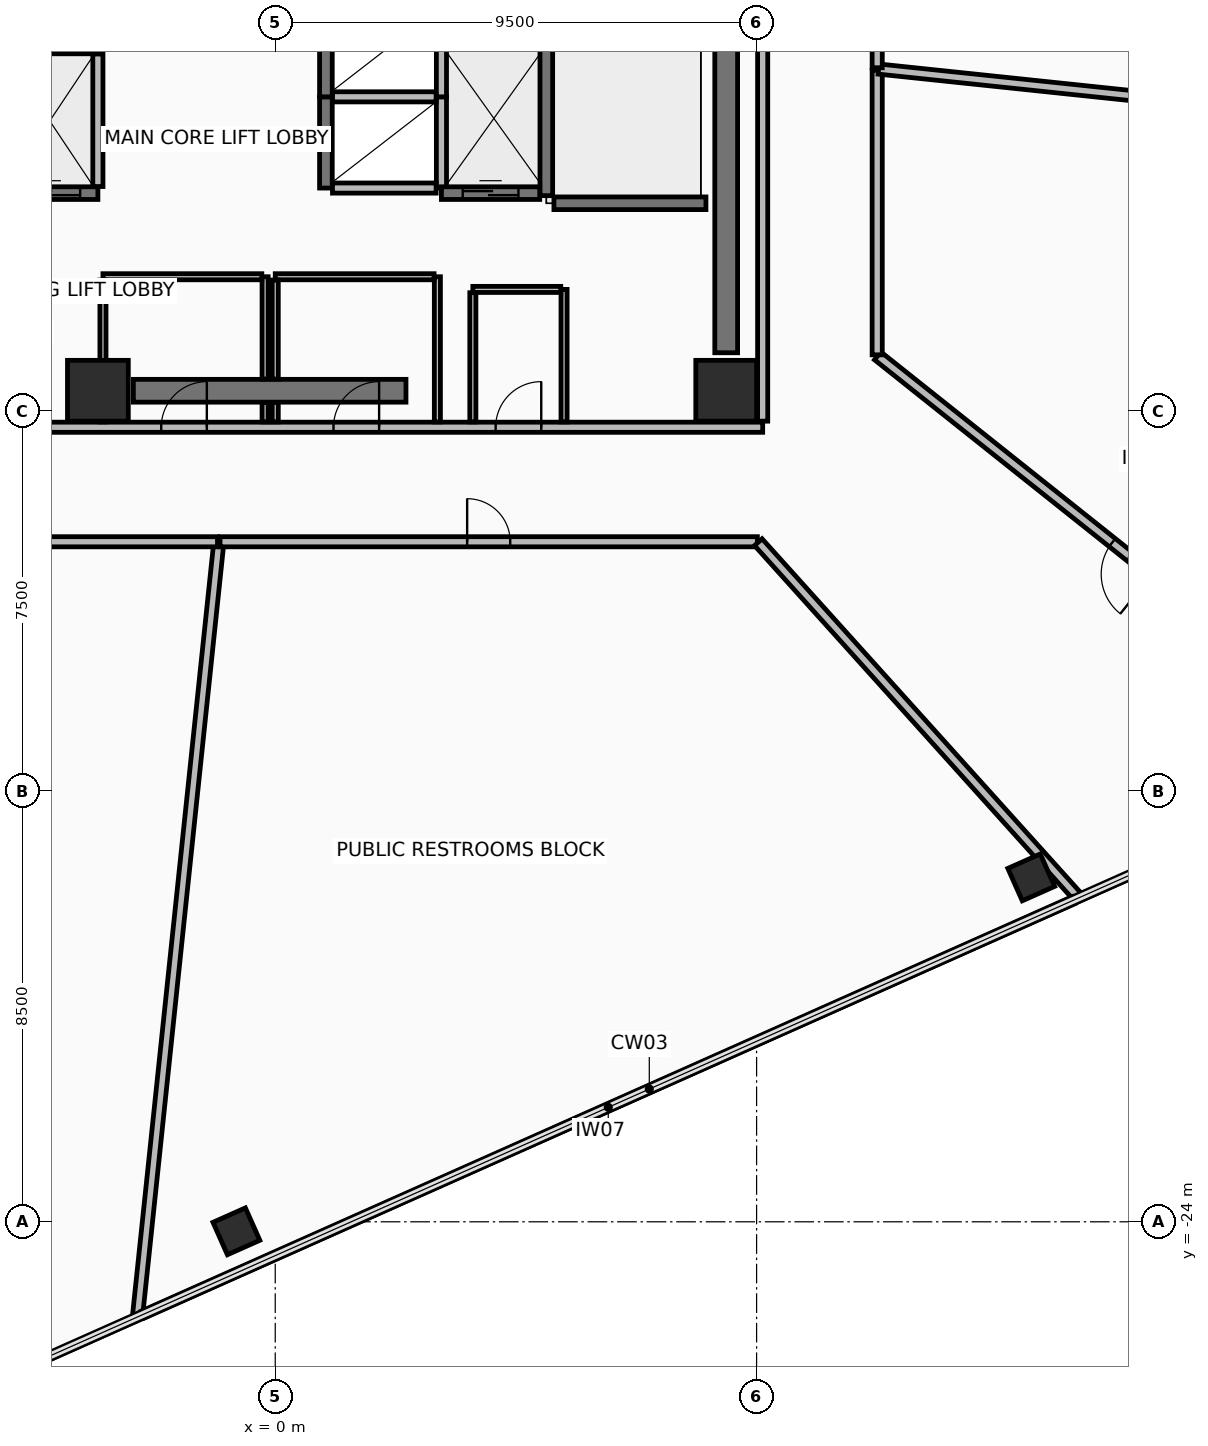
"""IFC4 building model, lengths in metres.
Left out: names, types, materials, properties, quantities, classifications, styles, units other than length and angle.
Written with IfcOpenShell. Run it as: python <this file> out.ifc"""

import sys

from ifc_helpers import new_model, si_unit, direction, frame, frame_2d, origin, origin_2d, place, context, subcontext, project, spatial, rectangle, hollow_rectangle, extrude, element, fill, save


model = new_model("IFC4")
c1 = context("Model", 3, precision=1e-05, world=origin(), true_north=direction((0.0, 1.0)))
c2 = subcontext(c1, "Body", "Model", "MODEL_VIEW")
j1 = project(units=[si_unit("LENGTHUNIT", "METRE"), si_unit("PLANEANGLEUNIT", "RADIAN")], contexts=[c1])
p1 = place(None, origin())
s1 = spatial("IfcSite", under=j1, at=p1, CompositionType="ELEMENT")
p2 = place(p1, origin())
s2 = spatial("IfcBuilding", under=s1, at=p2, CompositionType="ELEMENT")
p3 = place(p2, frame((0.0, 0.0, 126.85)))
s3 = spatial("IfcBuildingStorey", under=s2, at=p3, CompositionType="ELEMENT", Elevation=126.85)
for number, where, z_axis, x_axis in (
    (1, (-3.5, -7.6, 0.0), (0.0, 0.0, 1.0), (1.0, 0.0, 0.0)),
    (2, (8.9, -7.6, 0.0), (0.0, 0.0, 1.0), (1.0, 0.0, 0.0)),
):
    element("IfcColumn", number, at=place(p3, frame(where, z_axis=z_axis, x_axis=x_axis)), inside=s3, PredefinedType="COLUMN", context=c2, shape_type="SweptSolid", body=[
        extrude(rectangle(XDim=1.2, YDim=1.2, at=origin_2d()), origin(), (0.0, 0.0, 1.0), 3.6),
    ])
for number, where, z_axis, x_axis in (
    (3, (-0.766, -24.188, 0.0), (0.0, 0.0, 1.0), (0.914, 0.407, 0.0)),
    (4, (14.921, -17.204, 0.0), (0.0, 0.0, 1.0), (0.914, 0.407, 0.0)),
):
    element("IfcColumn", number, at=place(p3, frame(where, z_axis=z_axis, x_axis=x_axis)), inside=s3, PredefinedType="COLUMN", context=c2, shape_type="SweptSolid", body=[
        extrude(hollow_rectangle(XDim=0.7, YDim=0.7, WallThickness=0.04, at=origin_2d()), origin(), (0.0, 0.0, 1.0), 3.6),
    ])
p4 = place(p3, frame((-2.8, -7.6, 0.0), z_axis=(0.0, 0.0, 1.0), x_axis=(1.0, 0.0, 0.0)))
e5 = element("IfcWall", 5, at=p4, inside=s3, PredefinedType="SHEAR", context=c2, shape_type="SweptSolid", body=[
    extrude(rectangle(XDim=5.38, YDim=0.45, at=frame_2d((2.69, 0.0))), origin(), (0.0, 0.0, 1.0), 3.41),
])
p5 = place(p3, frame((8.9, -6.85, 0.0), z_axis=(0.0, 0.0, 1.0), x_axis=(0.0, 1.0, 0.0)))
e6 = element("IfcWall", 6, at=p5, inside=s3, PredefinedType="SHEAR", context=c2, shape_type="SweptSolid", body=[
    extrude(rectangle(XDim=10.7, YDim=0.45, at=frame_2d((5.35, 0.0))), origin(), (0.0, 0.0, 1.0), 3.41),
])
p6 = place(p3, frame((-9.62, -8.32, 0.0), z_axis=(0.0, 0.0, 1.0), x_axis=(1.0, 0.0, 0.0)))
e7 = element("IfcWall", 7, at=p6, inside=s3, PredefinedType="PARTITIONING", context=c2, shape_type="SweptSolid", body=[
    extrude(rectangle(XDim=19.24, YDim=0.2, at=frame_2d((9.62, 0.0))), origin(), (0.0, 0.0, 1.0), 2.855),
])
p7 = place(p6, frame((7.37, 0.0, 0.0)))
e8 = element("IfcOpeningElement", 8, at=p7, cuts=e7, PredefinedType="OPENING", context=c2, shape_type="SweptSolid", body=[
    extrude(rectangle(XDim=0.9, YDim=2.1, at=frame_2d((0.45, 1.05))), frame((0.0, 0.11, 0.0), z_axis=(0.0, -1.0, 0.0), x_axis=(1.0, 0.0, 0.0)), (0.0, 0.0, 1.0), 0.22),
])
p8 = place(p6, frame((10.77, 0.0, 0.0)))
e9 = element("IfcOpeningElement", 9, at=p8, cuts=e7, PredefinedType="OPENING", context=c2, shape_type="SweptSolid", body=[
    extrude(rectangle(XDim=0.9, YDim=2.1, at=frame_2d((0.45, 1.05))), frame((0.0, 0.11, 0.0), z_axis=(0.0, -1.0, 0.0), x_axis=(1.0, 0.0, 0.0)), (0.0, 0.0, 1.0), 0.22),
])
p9 = place(p6, frame((13.97, 0.0, 0.0)))
e10 = element("IfcOpeningElement", 10, at=p9, cuts=e7, PredefinedType="OPENING", context=c2, shape_type="SweptSolid", body=[
    extrude(rectangle(XDim=0.9, YDim=2.1, at=frame_2d((0.45, 1.05))), frame((0.0, 0.11, 0.0), z_axis=(0.0, -1.0, 0.0), x_axis=(1.0, 0.0, 0.0)), (0.0, 0.0, 1.0), 0.22),
])
p10 = place(p3, frame((9.62, -8.2, 0.0), z_axis=(0.0, 0.0, 1.0), x_axis=(0.0, 1.0, 0.0)))
e11 = element("IfcWall", 11, at=p10, inside=s3, PredefinedType="PARTITIONING", context=c2, shape_type="SweptSolid", body=[
    extrude(rectangle(XDim=16.4, YDim=0.2, at=frame_2d((8.2, 0.0))), origin(), (0.0, 0.0, 1.0), 2.855),
])
p11 = place(p10, frame((12.65, 0.0, 0.0)))
e12 = element("IfcOpeningElement", 12, at=p11, cuts=e11, PredefinedType="OPENING", context=c2, shape_type="SweptSolid", body=[
    extrude(rectangle(XDim=1.1, YDim=2.15, at=frame_2d((0.55, 1.075))), frame((0.0, 0.11, 0.0), z_axis=(0.0, -1.0, 0.0), x_axis=(1.0, 0.0, 0.0)), (0.0, 0.0, 1.0), 0.22),
])
p12 = place(p3, frame((5.35, -3.75, 0.0), z_axis=(0.0, 0.0, 1.0), x_axis=(0.0, 1.0, 0.0)))
e13 = element("IfcWall", 13, at=p12, inside=s3, PredefinedType="SHEAR", context=c2, shape_type="SweptSolid", body=[
    extrude(rectangle(XDim=7.3, YDim=0.25, at=frame_2d((3.65, 0.0))), origin(), (0.0, 0.0, 1.0), 3.41),
])
p13 = place(p3, frame((5.5, -3.9, 0.0), z_axis=(0.0, 0.0, 1.0), x_axis=(1.0, 0.0, 0.0)))
e14 = element("IfcWall", 14, at=p13, inside=s3, PredefinedType="SHEAR", context=c2, shape_type="SweptSolid", body=[
    extrude(rectangle(XDim=3.0, YDim=0.25, at=frame_2d((1.5, 0.0))), origin(), (0.0, 0.0, 1.0), 3.41),
])
p14 = place(p3, frame((1.0, -3.6, 0.0), z_axis=(0.0, 0.0, 1.0), x_axis=(0.0, 1.0, 0.0)))
e15 = element("IfcWall", 15, at=p14, inside=s3, PredefinedType="SHEAR", context=c2, shape_type="SweptSolid", body=[
    extrude(rectangle(XDim=1.8, YDim=0.25, at=frame_2d((0.9, 0.0))), origin(), (0.0, 0.0, 1.0), 3.41),
])
p15 = place(p3, frame((3.28, -3.6, 0.0), z_axis=(0.0, 0.0, 1.0), x_axis=(0.0, 1.0, 0.0)))
e16 = element("IfcWall", 16, at=p15, inside=s3, PredefinedType="PARTITIONING", context=c2, shape_type="SweptSolid", body=[
    extrude(rectangle(XDim=1.8, YDim=0.2, at=frame_2d((0.9, 0.0))), origin(), (0.0, 0.0, 1.0), 3.41),
])
for number, where, z_axis, x_axis in (
    (17, (1.13, -3.6, 0.0), (0.0, 0.0, 1.0), (1.0, 0.0, 0.0)),
    (18, (1.13, -1.8, 0.0), (0.0, 0.0, 1.0), (1.0, 0.0, 0.0)),
):
    element("IfcWall", number, at=place(p3, frame(where, z_axis=z_axis, x_axis=x_axis)), inside=s3, PredefinedType="PARTITIONING", context=c2, shape_type="SweptSolid", body=[
        extrude(rectangle(XDim=2.045, YDim=0.2, at=frame_2d((1.022, 0.0))), origin(), (0.0, 0.0, 1.0), 3.41),
    ])
p16 = place(p3, frame((1.0, -1.8, 0.0), z_axis=(0.0, 0.0, 1.0), x_axis=(0.0, 1.0, 0.0)))
e19 = element("IfcWall", 19, at=p16, inside=s3, PredefinedType="SHEAR", context=c2, shape_type="SweptSolid", body=[
    extrude(rectangle(XDim=1.8, YDim=0.25, at=frame_2d((0.9, 0.0))), origin(), (0.0, 0.0, 1.0), 3.41),
])
p17 = place(p3, frame((3.28, -1.8, 0.0), z_axis=(0.0, 0.0, 1.0), x_axis=(0.0, 1.0, 0.0)))
e20 = element("IfcWall", 20, at=p17, inside=s3, PredefinedType="PARTITIONING", context=c2, shape_type="SweptSolid", body=[
    extrude(rectangle(XDim=1.8, YDim=0.2, at=frame_2d((0.9, 0.0))), origin(), (0.0, 0.0, 1.0), 3.41),
])
p18 = place(p3, frame((-5.4, -3.7, 0.0), z_axis=(0.0, 0.0, 1.0), x_axis=(1.0, 0.0, 0.0)))
e21 = element("IfcWall", 21, at=p18, inside=s3, PredefinedType="SHEAR", context=c2, shape_type="SweptSolid", body=[
    extrude(rectangle(XDim=1.9, YDim=0.25, at=frame_2d((0.95, 0.0))), origin(), (0.0, 0.0, 1.0), 3.41),
])
p19 = place(p18, frame((0.35, 0.0, 0.0)))
e22 = element("IfcOpeningElement", 22, at=p19, cuts=e21, PredefinedType="OPENING", context=c2, shape_type="SweptSolid", body=[
    extrude(rectangle(XDim=1.2, YDim=2.2, at=frame_2d((0.6, 1.1))), frame((0.0, 0.135, 0.0), z_axis=(0.0, -1.0, 0.0), x_axis=(1.0, 0.0, 0.0)), (0.0, 0.0, 1.0), 0.27),
])
p20 = place(p3, frame((-5.27, -0.85, 0.0), z_axis=(0.0, 0.0, 1.0), x_axis=(1.0, 0.0, 0.0)))
e23 = element("IfcWall", 23, at=p20, inside=s3, PredefinedType="PARTITIONING", context=c2, shape_type="SweptSolid", body=[
    extrude(rectangle(XDim=1.77, YDim=0.2, at=frame_2d((0.885, 0.0))), origin(), (0.0, 0.0, 1.0), 3.41),
])
p21 = place(p3, frame((-3.5, -3.57, 0.0), z_axis=(0.0, 0.0, 1.0), x_axis=(0.0, 1.0, 0.0)))
e24 = element("IfcWall", 24, at=p21, inside=s3, PredefinedType="PARTITIONING", context=c2, shape_type="SweptSolid", body=[
    extrude(rectangle(XDim=2.615, YDim=0.2, at=frame_2d((1.308, 0.0))), origin(), (0.0, 0.0, 1.0), 3.41),
])
p22 = place(p3, frame((3.28, -3.7, 0.0), z_axis=(0.0, 0.0, 1.0), x_axis=(1.0, 0.0, 0.0)))
e25 = element("IfcWall", 25, at=p22, inside=s3, PredefinedType="SHEAR", context=c2, shape_type="SweptSolid", body=[
    extrude(rectangle(XDim=1.94, YDim=0.25, at=frame_2d((0.97, 0.0))), origin(), (0.0, 0.0, 1.0), 3.41),
])
p23 = place(p22, frame((0.42, 0.0, 0.0)))
e26 = element("IfcOpeningElement", 26, at=p23, cuts=e25, PredefinedType="OPENING", context=c2, shape_type="SweptSolid", body=[
    extrude(rectangle(XDim=1.1, YDim=2.2, at=frame_2d((0.55, 1.1))), frame((0.0, 0.135, 0.0), z_axis=(0.0, -1.0, 0.0), x_axis=(1.0, 0.0, 0.0)), (0.0, 0.0, 1.0), 0.27),
])
p24 = place(p3, frame((-0.2, -8.215, 0.0), z_axis=(0.0, 0.0, 1.0), x_axis=(0.0, 1.0, 0.0)))
e27 = element("IfcWall", 27, at=p24, inside=s3, PredefinedType="PARTITIONING", context=c2, shape_type="SweptSolid", body=[
    extrude(rectangle(XDim=0.385, YDim=0.12, at=frame_2d((0.192, 0.0))), origin(), (0.0, 0.0, 1.0), 2.605),
])
p25 = place(p3, frame((-0.2, -7.37, 0.0), z_axis=(0.0, 0.0, 1.0), x_axis=(0.0, 1.0, 0.0)))
e28 = element("IfcWall", 28, at=p25, inside=s3, PredefinedType="PARTITIONING", context=c2, shape_type="SweptSolid", body=[
    extrude(rectangle(XDim=2.02, YDim=0.12, at=frame_2d((1.01, 0.0))), origin(), (0.0, 0.0, 1.0), 2.605),
])
p26 = place(p3, frame((-0.265, -5.35, 0.0), z_axis=(0.0, 0.0, 1.0), x_axis=(-1.0, 0.0, 0.0)))
e29 = element("IfcWall", 29, at=p26, inside=s3, PredefinedType="PARTITIONING", context=c2, shape_type="SweptSolid", body=[
    extrude(rectangle(XDim=3.135, YDim=0.12, at=frame_2d((1.567, 0.0))), origin(), (0.0, 0.0, 1.0), 2.605),
])
p27 = place(p3, frame((-3.4, -5.415, 0.0), z_axis=(0.0, 0.0, 1.0), x_axis=(0.0, -1.0, 0.0)))
e30 = element("IfcWall", 30, at=p27, inside=s3, PredefinedType="PARTITIONING", context=c2, shape_type="SweptSolid", body=[
    extrude(rectangle(XDim=2.8, YDim=0.12, at=frame_2d((1.4, 0.0))), origin(), (0.0, 0.0, 1.0), 2.605),
])
p28 = place(p3, frame((3.2, -8.215, 0.0), z_axis=(0.0, 0.0, 1.0), x_axis=(0.0, 1.0, 0.0)))
e31 = element("IfcWall", 31, at=p28, inside=s3, PredefinedType="PARTITIONING", context=c2, shape_type="SweptSolid", body=[
    extrude(rectangle(XDim=2.865, YDim=0.12, at=frame_2d((1.433, 0.0))), origin(), (0.0, 0.0, 1.0), 2.605),
])
p29 = place(p3, frame((3.135, -5.35, 0.0), z_axis=(0.0, 0.0, 1.0), x_axis=(-1.0, 0.0, 0.0)))
e32 = element("IfcWall", 32, at=p29, inside=s3, PredefinedType="PARTITIONING", context=c2, shape_type="SweptSolid", body=[
    extrude(rectangle(XDim=3.135, YDim=0.12, at=frame_2d((1.567, 0.0))), origin(), (0.0, 0.0, 1.0), 3.41),
])
p30 = place(p3, frame((0.0, -5.415, 0.0), z_axis=(0.0, 0.0, 1.0), x_axis=(0.0, -1.0, 0.0)))
e33 = element("IfcWall", 33, at=p30, inside=s3, PredefinedType="PARTITIONING", context=c2, shape_type="SweptSolid", body=[
    extrude(rectangle(XDim=1.955, YDim=0.12, at=frame_2d((0.978, 0.0))), origin(), (0.0, 0.0, 1.0), 2.605),
])
p31 = place(p3, frame((0.0, -7.83, 0.0), z_axis=(0.0, 0.0, 1.0), x_axis=(0.0, -1.0, 0.0)))
e34 = element("IfcWall", 34, at=p31, inside=s3, PredefinedType="PARTITIONING", context=c2, shape_type="SweptSolid", body=[
    extrude(rectangle(XDim=0.385, YDim=0.12, at=frame_2d((0.192, 0.0))), origin(), (0.0, 0.0, 1.0), 2.605),
])
p32 = place(p3, frame((5.7, -8.215, 0.0), z_axis=(0.0, 0.0, 1.0), x_axis=(0.0, 1.0, 0.0)))
e35 = element("IfcWall", 35, at=p32, inside=s3, PredefinedType="PARTITIONING", context=c2, shape_type="SweptSolid", body=[
    extrude(rectangle(XDim=2.615, YDim=0.12, at=frame_2d((1.308, 0.0))), origin(), (0.0, 0.0, 1.0), 2.605),
])
p33 = place(p3, frame((5.635, -5.6, 0.0), z_axis=(0.0, 0.0, 1.0), x_axis=(-1.0, 0.0, 0.0)))
e36 = element("IfcWall", 36, at=p33, inside=s3, PredefinedType="PARTITIONING", context=c2, shape_type="SweptSolid", body=[
    extrude(rectangle(XDim=1.735, YDim=0.12, at=frame_2d((0.868, 0.0))), origin(), (0.0, 0.0, 1.0), 3.41),
])
p34 = place(p3, frame((3.9, -5.665, 0.0), z_axis=(0.0, 0.0, 1.0), x_axis=(0.0, -1.0, 0.0)))
e37 = element("IfcWall", 37, at=p34, inside=s3, PredefinedType="PARTITIONING", context=c2, shape_type="SweptSolid", body=[
    extrude(rectangle(XDim=2.55, YDim=0.12, at=frame_2d((1.275, 0.0))), origin(), (0.0, 0.0, 1.0), 2.605),
])
p35 = place(p3, frame((-2.72, -25.879, 0.0), z_axis=(0.0, 0.0, 1.0), x_axis=(0.104519310708, 0.994522857299, 0.0)))
e38 = element("IfcWall", 38, at=p35, inside=s3, PredefinedType="PARTITIONING", context=c2, shape_type="SweptSolid", body=[
    extrude(rectangle(XDim=15.361, YDim=0.2, at=frame_2d((7.68, 0.0))), origin(), (0.0, 0.0, 1.0), 2.705),
])
p36 = place(p3, frame((-1.09, -10.58, 0.0), z_axis=(0.0, 0.0, 1.0), x_axis=(1.0, 0.0, 0.0)))
e39 = element("IfcWall", 39, at=p36, inside=s3, PredefinedType="PARTITIONING", context=c2, shape_type="SweptSolid", body=[
    extrude(rectangle(XDim=10.605, YDim=0.2, at=frame_2d((5.302, 0.0))), origin(), (0.0, 0.0, 1.0), 3.41),
])
p37 = place(p36, frame((4.877, 0.0, 0.0)))
e40 = element("IfcOpeningElement", 40, at=p37, cuts=e39, PredefinedType="OPENING", context=c2, shape_type="SweptSolid", body=[
    extrude(rectangle(XDim=0.85, YDim=2.1, at=frame_2d((0.425, 1.05))), frame((0.0, 0.11, 0.0), z_axis=(0.0, -1.0, 0.0), x_axis=(1.0, 0.0, 0.0)), (0.0, 0.0, 1.0), 0.22),
])
p38 = place(p3, frame((9.534, -10.588, 0.0), z_axis=(0.0, 0.0, 1.0), x_axis=(0.669143190424, -0.743133494541, 0.0)))
e41 = element("IfcWall", 41, at=p38, inside=s3, PredefinedType="PARTITIONING", context=c2, shape_type="SweptSolid", body=[
    extrude(rectangle(XDim=9.447, YDim=0.2, at=frame_2d((4.723, 0.0))), origin(), (0.0, 0.0, 1.0), 2.705),
])
p39 = place(p3, frame((15.754, -17.654, 0.0), z_axis=(0.0, 0.0, 1.0), x_axis=(-0.913544896064, -0.406737904399, 0.0)))
e42 = element("IfcWall", 42, at=p39, inside=s3, PredefinedType="PARTITIONING", context=c2, shape_type="SweptSolid", body=[
    extrude(rectangle(XDim=20.101, YDim=0.15, at=frame_2d((10.05, 0.0))), origin(), (0.0, 0.0, 1.0), 3.41),
])
p40 = place(p3, frame((-9.97, -10.58, 0.0), z_axis=(0.0, 0.0, 1.0), x_axis=(1.0, 0.0, 0.0)))
e43 = element("IfcWall", 43, at=p40, inside=s3, PredefinedType="PARTITIONING", context=c2, shape_type="SweptSolid", body=[
    extrude(rectangle(XDim=8.83, YDim=0.2, at=frame_2d((4.415, 0.0))), origin(), (0.0, 0.0, 1.0), 2.855),
])
p41 = place(p3, frame((21.93, -14.904, 0.0), z_axis=(0.0, 0.0, 1.0), x_axis=(-0.782382790893, 0.622797855258, 0.0)))
e44 = element("IfcWall", 44, at=p41, inside=s3, PredefinedType="PARTITIONING", context=c2, shape_type="SweptSolid", body=[
    extrude(rectangle(XDim=12.834, YDim=0.2, at=frame_2d((6.417, 0.0))), origin(), (0.0, 0.0, 1.0), 2.705),
])
p42 = place(p41, frame((5.917, 0.0, 0.0)))
e45 = element("IfcOpeningElement", 45, at=p42, cuts=e44, PredefinedType="OPENING", context=c2, shape_type="SweptSolid", body=[
    extrude(rectangle(XDim=1.0, YDim=2.15, at=frame_2d((0.5, 1.075))), frame((0.0, 0.11, 0.0), z_axis=(0.0, -1.0, 0.0), x_axis=(1.0, 0.0, 0.0)), (0.0, 0.0, 1.0), 0.22),
])
p43 = place(p3, frame((11.88, -6.891, 0.0), z_axis=(0.0, 0.0, 1.0), x_axis=(0.0, 1.0, 0.0)))
e46 = element("IfcWall", 46, at=p43, inside=s3, PredefinedType="PARTITIONING", context=c2, shape_type="SweptSolid", body=[
    extrude(rectangle(XDim=5.615, YDim=0.2, at=frame_2d((2.808, 0.0))), origin(), (0.0, 0.0, 1.0), 3.41),
])
p44 = place(p3, frame((11.908, -1.251, 0.0), z_axis=(0.0, 0.0, 1.0), x_axis=(0.994520958229, -0.104537379166, 0.0)))
e47 = element("IfcWall", 47, at=p44, inside=s3, PredefinedType="PARTITIONING", context=c2, shape_type="SweptSolid", body=[
    extrude(rectangle(XDim=16.553, YDim=0.2, at=frame_2d((8.277, 0.0))), origin(), (0.0, 0.0, 1.0), 2.705),
])
p45 = place(p3, frame((11.88, -1.226, 0.0), z_axis=(0.0, 0.0, 1.0), x_axis=(0.0, 1.0, 0.0)))
e48 = element("IfcWall", 48, at=p45, inside=s3, PredefinedType="PARTITIONING", context=c2, shape_type="SweptSolid", body=[
    extrude(rectangle(XDim=7.528, YDim=0.2, at=frame_2d((3.764, 0.0))), origin(), (0.0, 0.0, 1.0), 2.855),
])
p46 = place(p45, frame((3.314, 0.0, 0.0)))
e49 = element("IfcOpeningElement", 49, at=p46, cuts=e48, PredefinedType="OPENING", context=c2, shape_type="SweptSolid", body=[
    extrude(rectangle(XDim=0.9, YDim=2.1, at=frame_2d((0.45, 1.05))), frame((0.0, 0.11, 0.0), z_axis=(0.0, -1.0, 0.0), x_axis=(1.0, 0.0, 0.0)), (0.0, 0.0, 1.0), 0.22),
])
p47 = place(p19, origin())
e50 = element("IfcDoor", 50, at=p47, inside=s3, OperationType="SLIDING_TO_RIGHT", PredefinedType="DOOR", context=c2, shape_type="SweptSolid", body=[
    extrude(rectangle(XDim=1.2, YDim=2.2, at=frame_2d((0.6, 1.1))), frame((0.0, 0.025, 0.0), z_axis=(0.0, -1.0, 0.0), x_axis=(1.0, 0.0, 0.0)), (0.0, 0.0, 1.0), 0.05),
])
fill(e22, e50)
p48 = place(p23, origin())
e51 = element("IfcDoor", 51, at=p48, inside=s3, OperationType="SLIDING_TO_LEFT", PredefinedType="DOOR", context=c2, shape_type="SweptSolid", body=[
    extrude(rectangle(XDim=1.1, YDim=2.2, at=frame_2d((0.55, 1.1))), frame((0.0, 0.025, 0.0), z_axis=(0.0, -1.0, 0.0), x_axis=(1.0, 0.0, 0.0)), (0.0, 0.0, 1.0), 0.05),
])
fill(e26, e51)
p49 = place(p7, frame((0.9, 0.0, 0.0), z_axis=(0.0, 0.0, 1.0), x_axis=(-1.0, 0.0, 0.0)))
e52 = element("IfcDoor", 52, at=p49, inside=s3, OperationType="SINGLE_SWING_LEFT", PredefinedType="DOOR", context=c2, shape_type="SweptSolid", body=[
    extrude(rectangle(XDim=0.9, YDim=2.1, at=frame_2d((0.45, 1.05))), frame((0.0, 0.025, 0.0), z_axis=(0.0, -1.0, 0.0), x_axis=(1.0, 0.0, 0.0)), (0.0, 0.0, 1.0), 0.05),
])
fill(e8, e52)
p50 = place(p8, frame((0.9, 0.0, 0.0), z_axis=(0.0, 0.0, 1.0), x_axis=(-1.0, 0.0, 0.0)))
e53 = element("IfcDoor", 53, at=p50, inside=s3, OperationType="SINGLE_SWING_LEFT", PredefinedType="DOOR", context=c2, shape_type="SweptSolid", body=[
    extrude(rectangle(XDim=0.9, YDim=2.1, at=frame_2d((0.45, 1.05))), frame((0.0, 0.025, 0.0), z_axis=(0.0, -1.0, 0.0), x_axis=(1.0, 0.0, 0.0)), (0.0, 0.0, 1.0), 0.05),
])
fill(e9, e53)
p51 = place(p9, frame((0.9, 0.0, 0.0), z_axis=(0.0, 0.0, 1.0), x_axis=(-1.0, 0.0, 0.0)))
e54 = element("IfcDoor", 54, at=p51, inside=s3, OperationType="SINGLE_SWING_LEFT", PredefinedType="DOOR", context=c2, shape_type="SweptSolid", body=[
    extrude(rectangle(XDim=0.9, YDim=2.1, at=frame_2d((0.45, 1.05))), frame((0.0, 0.025, 0.0), z_axis=(0.0, -1.0, 0.0), x_axis=(1.0, 0.0, 0.0)), (0.0, 0.0, 1.0), 0.05),
])
fill(e10, e54)
p52 = place(p37, origin())
e55 = element("IfcDoor", 55, at=p52, inside=s3, OperationType="SINGLE_SWING_RIGHT", PredefinedType="DOOR", context=c2, shape_type="SweptSolid", body=[
    extrude(rectangle(XDim=0.85, YDim=2.1, at=frame_2d((0.425, 1.05))), frame((0.0, 0.025, 0.0), z_axis=(0.0, -1.0, 0.0), x_axis=(1.0, 0.0, 0.0)), (0.0, 0.0, 1.0), 0.05),
])
fill(e40, e55)
p53 = place(p42, origin())
e56 = element("IfcDoor", 56, at=p53, inside=s3, OperationType="SINGLE_SWING_RIGHT", PredefinedType="DOOR", context=c2, shape_type="SweptSolid", body=[
    extrude(rectangle(XDim=1.0, YDim=2.15, at=frame_2d((0.5, 1.075))), frame((0.0, 0.025, 0.0), z_axis=(0.0, -1.0, 0.0), x_axis=(1.0, 0.0, 0.0)), (0.0, 0.0, 1.0), 0.05),
])
fill(e45, e56)
save(model, sys.argv[1])
